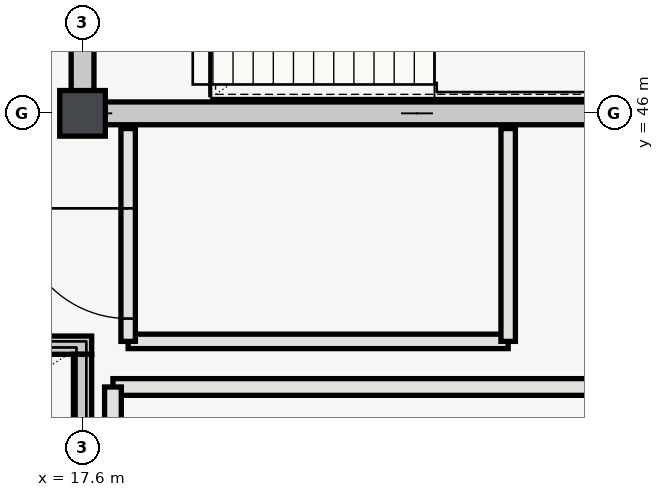
"""IFC4 building model, lengths in metres.
Left out: names, types, materials, properties, quantities, classifications, styles, units other than length and angle.
Written with IfcOpenShell. Run it as: python <this file> out.ifc"""

import sys

from ifc_helpers import new_model, si_unit, direction, frame, frame_2d, origin, origin_2d, place, context, subcontext, project, spatial, rectangle, extrude, element, fill, save


model = new_model("IFC4")
c1 = context("Model", 3, precision=1e-05, world=origin(), true_north=direction((0.0, 1.0)))
c2 = subcontext(c1, "Body", "Model", "MODEL_VIEW")
j1 = project(units=[si_unit("LENGTHUNIT", "METRE"), si_unit("PLANEANGLEUNIT", "RADIAN")], contexts=[c1])
p1 = place(None, origin())
s1 = spatial("IfcSite", under=j1, at=p1, CompositionType="ELEMENT")
p2 = place(p1, origin())
s2 = spatial("IfcBuilding", under=s1, at=p2, CompositionType="ELEMENT")
p3 = place(p2, frame((0.0, 0.0, 33.0)))
s3 = spatial("IfcBuildingStorey", under=s2, at=p3, CompositionType="ELEMENT", Elevation=33.0)
p4 = place(p3, frame((17.6, 46.0, 0.0), z_axis=(0.0, 0.0, 1.0), x_axis=(1.0, 0.0, 0.0)))
e1 = element("IfcColumn", 1, at=p4, inside=s3, PredefinedType="COLUMN", context=c2, shape_type="SweptSolid", body=[
    extrude(rectangle(XDim=0.6, YDim=0.6, at=origin_2d()), origin(), (0.0, 0.0, 1.0), 4.2),
])
p5 = place(p3, frame((17.45, 46.0, 0.0), z_axis=(0.0, 0.0, 1.0), x_axis=(1.0, 0.0, 0.0)))
e2 = element("IfcWall", 2, at=p5, inside=s3, PredefinedType="SHEAR", context=c2, shape_type="SweptSolid", body=[
    extrude(rectangle(XDim=9.1, YDim=0.3, at=frame_2d((4.55, 0.0))), origin(), (0.0, 0.0, 1.0), 3.92),
])
p6 = place(p3, frame((17.6, 46.15, 0.0), z_axis=(0.0, 0.0, 1.0), x_axis=(0.0, 1.0, 0.0)))
e3 = element("IfcWall", 3, at=p6, inside=s3, PredefinedType="SHEAR", context=c2, shape_type="SweptSolid", body=[
    extrude(rectangle(XDim=7.7, YDim=0.3, at=frame_2d((3.85, 0.0))), origin(), (0.0, 0.0, 1.0), 3.92),
])
p7 = place(p6, frame((1.65, 0.0, 0.0)))
e4 = element("IfcOpeningElement", 4, at=p7, cuts=e3, PredefinedType="OPENING", context=c2, shape_type="SweptSolid", body=[
    extrude(rectangle(XDim=1.4, YDim=2.2, at=frame_2d((0.7, 1.1))), frame((0.0, 0.16, 0.0), z_axis=(0.0, -1.0, 0.0), x_axis=(1.0, 0.0, 0.0)), (0.0, 0.0, 1.0), 0.32),
])
p8 = place(p3, frame((18.2, 43.0, 0.0), z_axis=(0.0, 0.0, 1.0), x_axis=(1.0, 0.0, 0.0)))
e5 = element("IfcWall", 5, at=p8, inside=s3, PredefinedType="PARTITIONING", context=c2, shape_type="SweptSolid", body=[
    extrude(rectangle(XDim=5.0, YDim=0.19, at=frame_2d((2.5, 0.0))), origin(), (0.0, 0.0, 1.0), 3.92),
])
p9 = place(p3, frame((18.2, 45.8, 0.0), z_axis=(0.0, 0.0, 1.0), x_axis=(0.0, -1.0, 0.0)))
e6 = element("IfcWall", 6, at=p9, inside=s3, PredefinedType="PARTITIONING", context=c2, shape_type="SweptSolid", body=[
    extrude(rectangle(XDim=2.8, YDim=0.19, at=frame_2d((1.4, 0.0))), origin(), (0.0, 0.0, 1.0), 3.92),
])
p10 = place(p9, frame((1.05, 0.0, 0.0)))
e7 = element("IfcOpeningElement", 7, at=p10, cuts=e6, PredefinedType="OPENING", context=c2, shape_type="SweptSolid", body=[
    extrude(rectangle(XDim=1.45, YDim=2.2, at=frame_2d((0.725, 1.1))), frame((0.0, 0.105, 0.0), z_axis=(0.0, -1.0, 0.0), x_axis=(1.0, 0.0, 0.0)), (0.0, 0.0, 1.0), 0.21),
])
p11 = place(p3, frame((23.2, 43.0, 0.0), z_axis=(0.0, 0.0, 1.0), x_axis=(0.0, 1.0, 0.0)))
e8 = element("IfcWall", 8, at=p11, inside=s3, PredefinedType="PARTITIONING", context=c2, shape_type="SweptSolid", body=[
    extrude(rectangle(XDim=2.8, YDim=0.19, at=frame_2d((1.4, 0.0))), origin(), (0.0, 0.0, 1.0), 3.92),
])
p12 = place(p3, frame((26.2, 42.4, 0.0), z_axis=(0.0, 0.0, 1.0), x_axis=(-1.0, 0.0, 0.0)))
e9 = element("IfcWall", 9, at=p12, inside=s3, PredefinedType="PARTITIONING", context=c2, shape_type="SweptSolid", body=[
    extrude(rectangle(XDim=8.2, YDim=0.22, at=frame_2d((4.1, 0.0))), origin(), (0.0, 0.0, 1.0), 3.92),
])
p13 = place(p3, frame((18.0, 42.4, 0.0), z_axis=(0.0, 0.0, 1.0), x_axis=(0.0, -1.0, 0.0)))
e10 = element("IfcWall", 10, at=p13, inside=s3, PredefinedType="PARTITIONING", context=c2, shape_type="SweptSolid", body=[
    extrude(rectangle(XDim=11.6, YDim=0.22, at=frame_2d((5.8, 0.0))), origin(), (0.0, 0.0, 1.0), 3.92),
])
p14 = place(p3, frame((17.72, 42.95, 0.0), z_axis=(0.0, 0.0, 1.0), x_axis=(-1.0, 0.0, 0.0)))
e11 = element("IfcWall", 11, at=p14, inside=s3, PredefinedType="SHEAR", context=c2, shape_type="SweptSolid", body=[
    extrude(rectangle(XDim=9.04, YDim=0.24, at=frame_2d((4.52, 0.0))), origin(), (0.0, 0.0, 1.0), 3.95),
])
p15 = place(p3, frame((17.6, 38.67, 0.0), z_axis=(0.0, 0.0, 1.0), x_axis=(0.0, 1.0, 0.0)))
e12 = element("IfcWall", 12, at=p15, inside=s3, PredefinedType="SHEAR", context=c2, shape_type="SweptSolid", body=[
    extrude(rectangle(XDim=4.16, YDim=0.24, at=frame_2d((2.08, 0.0))), origin(), (0.0, 0.0, 1.0), 3.95),
])
p16 = place(p10, origin())
e13 = element("IfcDoor", 13, at=p16, inside=s3, OperationType="SINGLE_SWING_LEFT", PredefinedType="DOOR", context=c2, shape_type="SweptSolid", body=[
    extrude(rectangle(XDim=1.45, YDim=2.2, at=frame_2d((0.725, 1.1))), frame((0.0, 0.025, 0.0), z_axis=(0.0, -1.0, 0.0), x_axis=(1.0, 0.0, 0.0)), (0.0, 0.0, 1.0), 0.05),
])
fill(e7, e13)
save(model, sys.argv[1])
